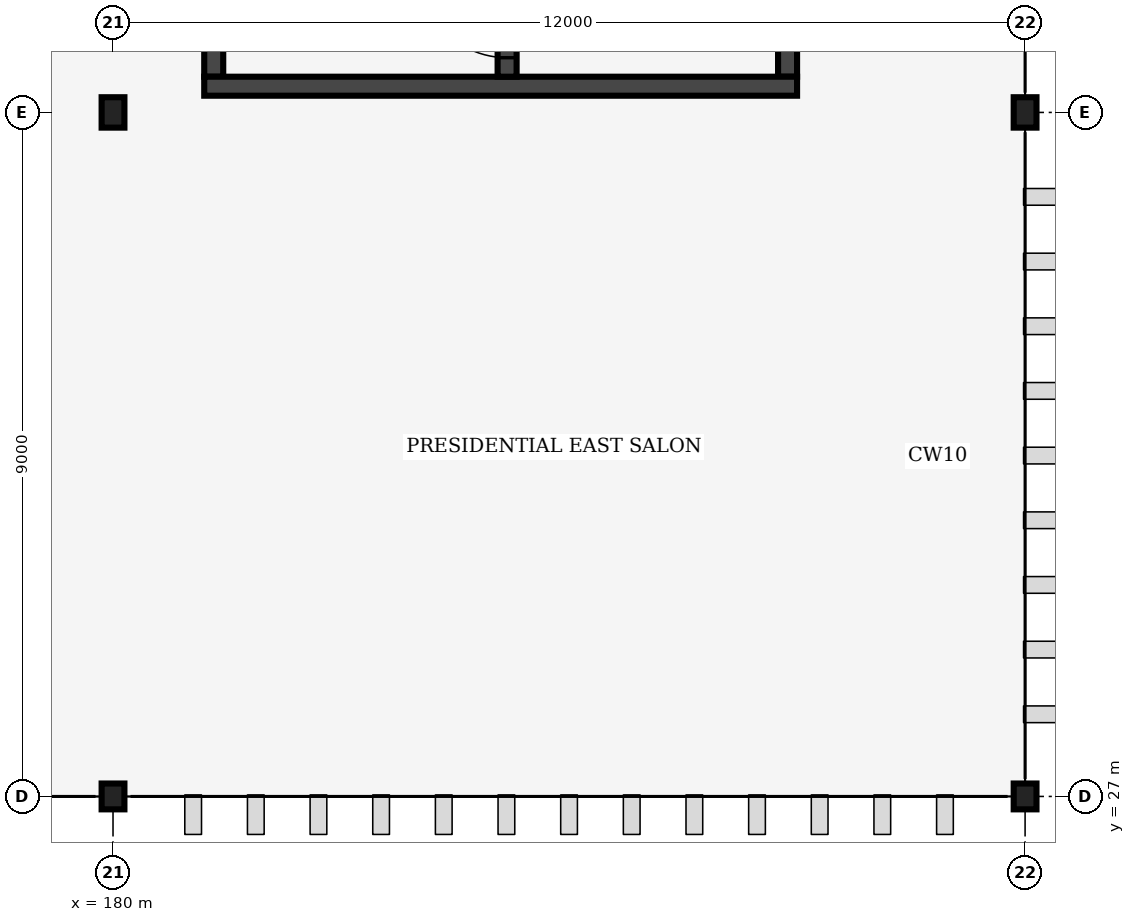
"""IFC4 building model, lengths in metres.
Left out: names, types, materials, properties, quantities, classifications, styles, units other than length and angle.
Written with IfcOpenShell. Run it as: python <this file> out.ifc"""

import sys

from ifc_helpers import new_model, si_unit, direction, frame, frame_2d, origin, origin_2d, place, context, subcontext, project, spatial, rectangle, i_section, extrude, element, fill, save


model = new_model("IFC4")
c1 = context("Model", 3, precision=1e-05, world=origin(), true_north=direction((0.0, 1.0)))
c2 = subcontext(c1, "Body", "Model", "MODEL_VIEW")
j1 = project(units=[si_unit("LENGTHUNIT", "METRE"), si_unit("PLANEANGLEUNIT", "RADIAN")], contexts=[c1])
p1 = place(None, origin())
s1 = spatial("IfcSite", under=j1, at=p1, CompositionType="ELEMENT")
p2 = place(p1, origin())
s2 = spatial("IfcBuilding", under=s1, at=p2, CompositionType="ELEMENT")
p3 = place(p2, frame((0.0, 0.0, 26.8)))
s3 = spatial("IfcBuildingStorey", under=s2, at=p3, CompositionType="ELEMENT", Elevation=26.8)
p4 = place(p3, frame((180.0, 27.0, 0.0), z_axis=(0.0, 0.0, 1.0), x_axis=(1.0, 0.0, 0.0)))
e1 = element("IfcColumn", 1, at=p4, inside=s3, PredefinedType="COLUMN", context=c2, shape_type="SweptSolid", body=[
    extrude(i_section(OverallWidth=0.3, OverallDepth=0.34, WebThickness=0.012, FlangeThickness=0.021, FilletRadius=0.027, at=origin_2d()), origin(), (0.0, 0.0, 1.0), 3.0),
])
p5 = place(p3, frame((180.0, 36.0, 0.0), z_axis=(0.0, 0.0, 1.0), x_axis=(1.0, 0.0, 0.0)))
e2 = element("IfcColumn", 2, at=p5, inside=s3, PredefinedType="COLUMN", context=c2, shape_type="SweptSolid", body=[
    extrude(i_section(OverallWidth=0.3, OverallDepth=0.4, WebThickness=0.013, FlangeThickness=0.024, FilletRadius=0.027, at=origin_2d()), origin(), (0.0, 0.0, 1.0), 3.0),
])
p6 = place(p3, frame((192.0, 27.0, 0.0), z_axis=(0.0, 0.0, 1.0), x_axis=(1.0, 0.0, 0.0)))
e3 = element("IfcColumn", 3, at=p6, inside=s3, PredefinedType="COLUMN", context=c2, shape_type="SweptSolid", body=[
    extrude(i_section(OverallWidth=0.3, OverallDepth=0.34, WebThickness=0.012, FlangeThickness=0.021, FilletRadius=0.027, at=origin_2d()), origin(), (0.0, 0.0, 1.0), 3.0),
])
p7 = place(p3, frame((192.0, 36.0, 0.0), z_axis=(0.0, 0.0, 1.0), x_axis=(1.0, 0.0, 0.0)))
e4 = element("IfcColumn", 4, at=p7, inside=s3, PredefinedType="COLUMN", context=c2, shape_type="SweptSolid", body=[
    extrude(i_section(OverallWidth=0.3, OverallDepth=0.4, WebThickness=0.013, FlangeThickness=0.024, FilletRadius=0.027, at=origin_2d()), origin(), (0.0, 0.0, 1.0), 3.0),
])
p8 = place(p3, frame((181.325, 36.47, 0.0), z_axis=(0.0, 0.0, 1.0), x_axis=(0.0, 1.0, 0.0)))
e5 = element("IfcWall", 5, at=p8, inside=s3, PredefinedType="SHEAR", context=c2, shape_type="SweptSolid", body=[
    extrude(rectangle(XDim=8.06, YDim=0.25, at=frame_2d((4.03, 0.0))), origin(), (0.0, 0.0, 1.0), 2.64),
])
p9 = place(p8, frame((1.15, 0.0, 0.0)))
e6 = element("IfcOpeningElement", 6, at=p9, cuts=e5, PredefinedType="OPENING", context=c2, shape_type="SweptSolid", body=[
    extrude(rectangle(XDim=1.8, YDim=2.2, at=frame_2d((0.9, 1.1))), frame((0.0, 0.135, 0.0), z_axis=(0.0, -1.0, 0.0), x_axis=(1.0, 0.0, 0.0)), (0.0, 0.0, 1.0), 0.27),
])
p10 = place(p3, frame((188.875, 36.47, 0.0), z_axis=(0.0, 0.0, 1.0), x_axis=(0.0, 1.0, 0.0)))
e7 = element("IfcWall", 7, at=p10, inside=s3, PredefinedType="SHEAR", context=c2, shape_type="SweptSolid", body=[
    extrude(rectangle(XDim=8.06, YDim=0.25, at=frame_2d((4.03, 0.0))), origin(), (0.0, 0.0, 1.0), 2.64),
])
p11 = place(p3, frame((181.2, 36.345, 0.0), z_axis=(0.0, 0.0, 1.0), x_axis=(1.0, 0.0, 0.0)))
e8 = element("IfcWall", 8, at=p11, inside=s3, PredefinedType="SHEAR", context=c2, shape_type="SweptSolid", body=[
    extrude(rectangle(XDim=7.8, YDim=0.25, at=frame_2d((3.9, 0.0))), origin(), (0.0, 0.0, 1.0), 2.64),
])
p12 = place(p3, frame((185.185, 36.47, 0.0), z_axis=(0.0, 0.0, 1.0), x_axis=(0.0, 1.0, 0.0)))
e9 = element("IfcWall", 9, at=p12, inside=s3, PredefinedType="SHEAR", context=c2, shape_type="SweptSolid", body=[
    extrude(rectangle(XDim=8.06, YDim=0.25, at=frame_2d((4.03, 0.0))), origin(), (0.0, 0.0, 1.0), 2.64),
])
p13 = place(p12, frame((0.25, 0.0, 0.0)))
e10 = element("IfcOpeningElement", 10, at=p13, cuts=e9, PredefinedType="OPENING", context=c2, shape_type="SweptSolid", body=[
    extrude(rectangle(XDim=1.15, YDim=2.15, at=frame_2d((0.575, 1.075))), frame((0.0, 0.135, 0.0), z_axis=(0.0, -1.0, 0.0), x_axis=(1.0, 0.0, 0.0)), (0.0, 0.0, 1.0), 0.27),
])
p14 = place(p13, origin())
e11 = element("IfcDoor", 11, at=p14, inside=s3, OperationType="SINGLE_SWING_RIGHT", PredefinedType="DOOR", context=c2, shape_type="SweptSolid", body=[
    extrude(rectangle(XDim=1.15, YDim=2.15, at=frame_2d((0.575, 1.075))), frame((0.0, 0.025, 0.0), z_axis=(0.0, -1.0, 0.0), x_axis=(1.0, 0.0, 0.0)), (0.0, 0.0, 1.0), 0.05),
])
fill(e10, e11)
save(model, sys.argv[1])
